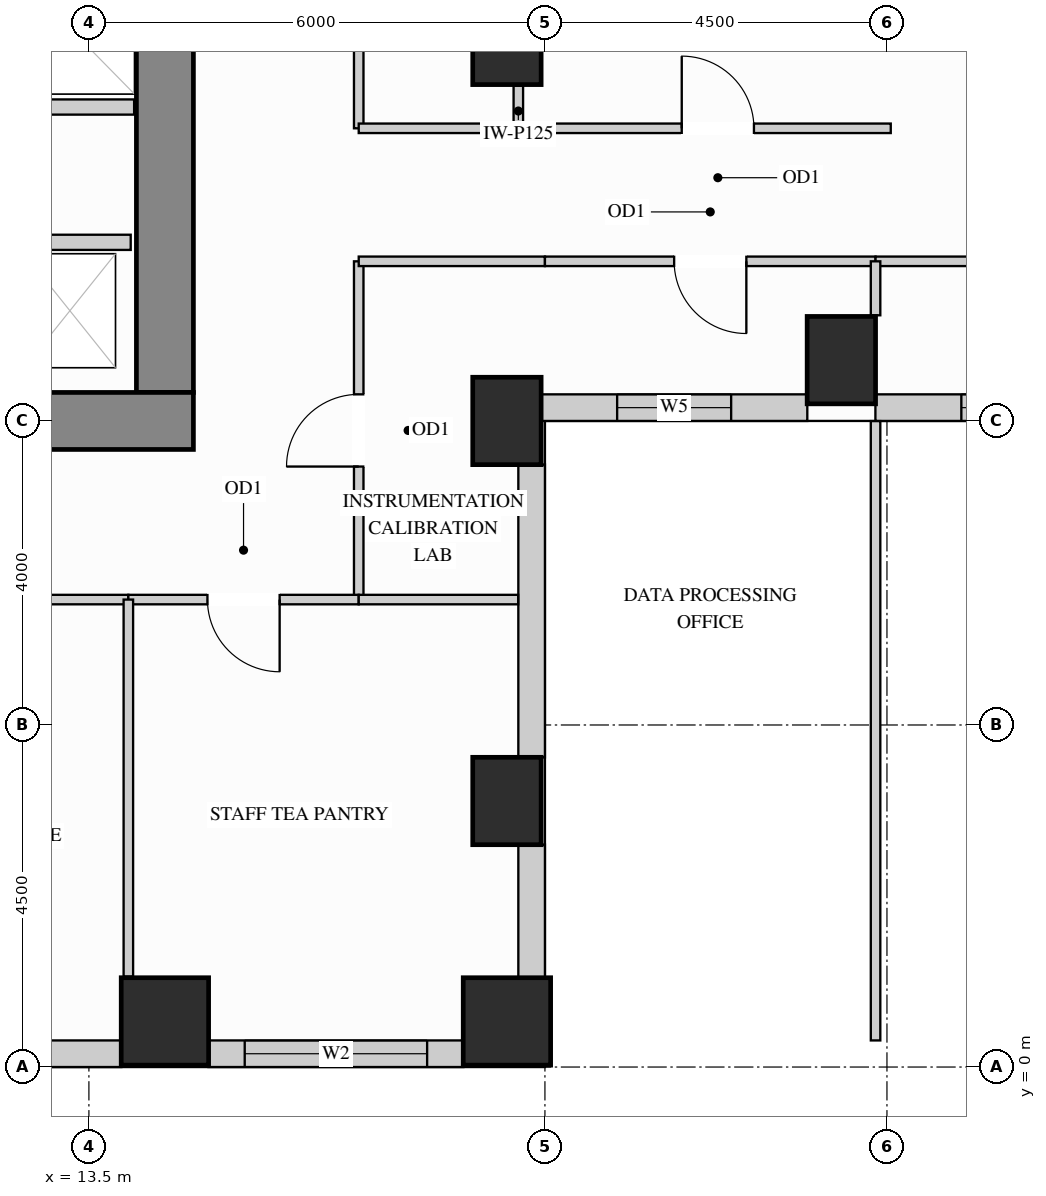
"""IFC4 building model, lengths in metres.
Left out: names, types, materials, properties, quantities, classifications, styles, units other than length and angle.
Written with IfcOpenShell. Run it as: python <this file> out.ifc"""

import sys

from ifc_helpers import new_model, si_unit, direction, frame, frame_2d, origin, origin_2d, place, context, subcontext, project, spatial, rectangle, extrude, source, transform, mapped, element, fill, save


model = new_model("IFC4")
c1 = context("Model", 3, precision=1e-05, world=origin(), true_north=direction((0.0, 1.0)))
c2 = subcontext(c1, "Body", "Model", "MODEL_VIEW")
j1 = project(units=[si_unit("LENGTHUNIT", "METRE"), si_unit("PLANEANGLEUNIT", "RADIAN")], contexts=[c1])
p1 = place(None, origin())
s1 = spatial("IfcSite", under=j1, at=p1, CompositionType="ELEMENT")
p2 = place(p1, origin())
s2 = spatial("IfcBuilding", under=s1, at=p2, CompositionType="ELEMENT")
p3 = place(p2, frame((0.0, 0.0, 95.4)))
s3 = spatial("IfcBuildingStorey", under=s2, at=p3, CompositionType="ELEMENT", Elevation=95.4)
m1 = source(origin(), c2, "Body", "SweptSolid", [
    extrude(rectangle(XDim=0.9, YDim=1.15, at=origin_2d()), origin(), (0.0, 0.0, 1.0), 3.38),
])
for number, where, z_axis, x_axis in (
    (1, (19.0, 13.5, 0.0), (0.0, 0.0, 1.0), (1.0, 0.0, 0.0)),
    (2, (19.0, 3.5, 0.0), (0.0, 0.0, 1.0), (1.0, 0.0, 0.0)),
    (3, (19.0, 8.5, 0.0), (0.0, 0.0, 1.0), (1.0, 0.0, 0.0)),
    (4, (23.4, 9.3, 0.0), (0.0, 0.0, 1.0), (1.0, 0.0, 0.0)),
):
    element("IfcColumn", number, at=place(p3, frame(where, z_axis=z_axis, x_axis=x_axis)), inside=s3, PredefinedType="COLUMN", context=c2, shape_type="MappedRepresentation", body=[
        mapped(m1, transform((0.0, 0.0, 0.0), x_axis=(1.0, 0.0, 0.0), y_axis=(0.0, 1.0, 0.0), z_axis=(0.0, 0.0, 1.0))),
    ])
m2 = source(origin(), c2, "Body", "SweptSolid", [
    extrude(rectangle(XDim=1.15, YDim=1.15, at=origin_2d()), origin(), (0.0, 0.0, 1.0), 3.38),
])
for number, where, z_axis, x_axis in (
    (5, (14.5, 0.6, 0.0), (0.0, 0.0, 1.0), (1.0, 0.0, 0.0)),
    (6, (19.0, 0.6, 0.0), (0.0, 0.0, 1.0), (1.0, 0.0, 0.0)),
):
    element("IfcColumn", number, at=place(p3, frame(where, z_axis=z_axis, x_axis=x_axis)), inside=s3, PredefinedType="COLUMN", context=c2, shape_type="MappedRepresentation", body=[
        mapped(m2, transform((0.0, 0.0, 0.0), x_axis=(1.0, 0.0, 0.0), y_axis=(0.0, 1.0, 0.0), z_axis=(0.0, 0.0, 1.0))),
    ])
m3 = source(origin(), c2, "Body", "SweptSolid", [
    extrude(rectangle(XDim=9.945, YDim=0.75, at=frame_2d((4.973, 0.0))), origin(), (0.0, 0.0, 1.0), 3.38),
])
p4 = place(p3, frame((14.5, 8.875, 0.0), z_axis=(0.0, 0.0, 1.0), x_axis=(0.0, 1.0, 0.0)))
e7 = element("IfcWall", 7, at=p4, inside=s3, PredefinedType="SHEAR", context=c2, shape_type="MappedRepresentation", body=[
    mapped(m3, transform((0.0, 0.0, 0.0), x_axis=(1.0, 0.0, 0.0), y_axis=(0.0, 1.0, 0.0), z_axis=(0.0, 0.0, 1.0))),
])
m4 = source(origin(), c2, "Body", "SweptSolid", [
    extrude(rectangle(XDim=10.75, YDim=0.75, at=frame_2d((5.375, 0.0))), origin(), (0.0, 0.0, 1.0), 3.38),
])
p5 = place(p3, frame((4.125, 8.5, 0.0), z_axis=(0.0, 0.0, 1.0), x_axis=(1.0, 0.0, 0.0)))
e8 = element("IfcWall", 8, at=p5, inside=s3, PredefinedType="SHEAR", context=c2, shape_type="MappedRepresentation", body=[
    mapped(m4, transform((0.0, 0.0, 0.0), x_axis=(1.0, 0.0, 0.0), y_axis=(0.0, 1.0, 0.0), z_axis=(0.0, 0.0, 1.0))),
])
p6 = place(p3, frame((9.573, 0.175, 0.0), z_axis=(0.0, 0.0, 1.0), x_axis=(1.0, 0.0, 0.0)))
e9 = element("IfcWall", 9, at=p6, inside=s3, PredefinedType="SOLIDWALL", context=c2, shape_type="SweptSolid", body=[
    extrude(rectangle(XDim=4.354, YDim=0.35, at=frame_2d((2.177, 0.0))), origin(), (0.0, 0.0, 1.0), 3.365),
])
p7 = place(p6, frame((0.977, 0.0, 0.78)))
e10 = element("IfcOpeningElement", 10, at=p7, cuts=e9, PredefinedType="OPENING", context=c2, shape_type="SweptSolid", body=[
    extrude(rectangle(XDim=2.4, YDim=2.1, at=frame_2d((1.2, 1.05))), frame((0.0, 0.185, 0.0), z_axis=(0.0, -1.0, 0.0), x_axis=(1.0, 0.0, 0.0)), (0.0, 0.0, 1.0), 0.37),
])
p8 = place(p3, frame((15.073, 0.175, 0.0), z_axis=(0.0, 0.0, 1.0), x_axis=(1.0, 0.0, 0.0)))
e11 = element("IfcWall", 11, at=p8, inside=s3, PredefinedType="SOLIDWALL", context=c2, shape_type="SweptSolid", body=[
    extrude(rectangle(XDim=3.354, YDim=0.35, at=frame_2d((1.677, 0.0))), origin(), (0.0, 0.0, 1.0), 3.365),
])
p9 = place(p8, frame((0.477, 0.0, 0.78)))
e12 = element("IfcOpeningElement", 12, at=p9, cuts=e11, PredefinedType="OPENING", context=c2, shape_type="SweptSolid", body=[
    extrude(rectangle(XDim=2.4, YDim=2.1, at=frame_2d((1.2, 1.05))), frame((0.0, 0.185, 0.0), z_axis=(0.0, -1.0, 0.0), x_axis=(1.0, 0.0, 0.0)), (0.0, 0.0, 1.0), 0.37),
])
m5 = source(origin(), c2, "Body", "SweptSolid", [
    extrude(rectangle(XDim=1.754, YDim=0.35, at=frame_2d((0.877, 0.0))), origin(), (0.0, 0.0, 1.0), 2.519),
])
p10 = place(p3, frame((19.325, 1.173, 0.0), z_axis=(0.0, 0.0, 1.0), x_axis=(0.0, 1.0, 0.0)))
e13 = element("IfcWall", 13, at=p10, inside=s3, PredefinedType="SOLIDWALL", context=c2, shape_type="MappedRepresentation", body=[
    mapped(m5, transform((0.0, 0.0, 0.0), x_axis=(1.0, 0.0, 0.0), y_axis=(0.0, 1.0, 0.0), z_axis=(0.0, 0.0, 1.0))),
])
m6 = source(origin(), c2, "Body", "SweptSolid", [
    extrude(rectangle(XDim=3.854, YDim=0.35, at=frame_2d((1.927, 0.0))), origin(), (0.0, 0.0, 1.0), 2.519),
])
p11 = place(p3, frame((19.325, 4.073, 0.0), z_axis=(0.0, 0.0, 1.0), x_axis=(0.0, 1.0, 0.0)))
e14 = element("IfcWall", 14, at=p11, inside=s3, PredefinedType="SOLIDWALL", context=c2, shape_type="MappedRepresentation", body=[
    mapped(m6, transform((0.0, 0.0, 0.0), x_axis=(1.0, 0.0, 0.0), y_axis=(0.0, 1.0, 0.0), z_axis=(0.0, 0.0, 1.0))),
])
p12 = place(p3, frame((19.448, 8.675, 0.0), z_axis=(0.0, 0.0, 1.0), x_axis=(1.0, 0.0, 0.0)))
e15 = element("IfcWall", 15, at=p12, inside=s3, PredefinedType="SOLIDWALL", context=c2, shape_type="SweptSolid", body=[
    extrude(rectangle(XDim=3.504, YDim=0.35, at=frame_2d((1.752, 0.0))), origin(), (0.0, 0.0, 1.0), 3.365),
])
p13 = place(p12, frame((1.002, 0.0, 0.78)))
e16 = element("IfcOpeningElement", 16, at=p13, cuts=e15, PredefinedType="OPENING", context=c2, shape_type="SweptSolid", body=[
    extrude(rectangle(XDim=1.5, YDim=2.0, at=frame_2d((0.75, 1.0))), frame((0.0, 0.185, 0.0), z_axis=(0.0, -1.0, 0.0), x_axis=(1.0, 0.0, 0.0)), (0.0, 0.0, 1.0), 0.37),
])
p14 = place(p3, frame((23.848, 8.675, 0.0), z_axis=(0.0, 0.0, 1.0), x_axis=(1.0, 0.0, 0.0)))
e17 = element("IfcWall", 17, at=p14, inside=s3, PredefinedType="SOLIDWALL", context=c2, shape_type="SweptSolid", body=[
    extrude(rectangle(XDim=6.204, YDim=0.35, at=frame_2d((3.102, 0.0))), origin(), (0.0, 0.0, 1.0), 3.365),
])
p15 = place(p14, frame((1.131, 0.0, 0.78)))
e18 = element("IfcOpeningElement", 18, at=p15, cuts=e17, PredefinedType="OPENING", context=c2, shape_type="SweptSolid", body=[
    extrude(rectangle(XDim=1.5, YDim=2.0, at=frame_2d((0.75, 1.0))), frame((0.0, 0.185, 0.0), z_axis=(0.0, -1.0, 0.0), x_axis=(1.0, 0.0, 0.0)), (0.0, 0.0, 1.0), 0.37),
])
p16 = place(p14, frame((3.441, 0.0, 0.78)))
e19 = element("IfcOpeningElement", 19, at=p16, cuts=e17, PredefinedType="OPENING", context=c2, shape_type="SweptSolid", body=[
    extrude(rectangle(XDim=1.5, YDim=2.0, at=frame_2d((0.75, 1.0))), frame((0.0, 0.185, 0.0), z_axis=(0.0, -1.0, 0.0), x_axis=(1.0, 0.0, 0.0)), (0.0, 0.0, 1.0), 0.37),
])
m7 = source(origin(), c2, "Body", "SweptSolid", [
    extrude(rectangle(XDim=0.56, YDim=0.125, at=frame_2d((0.28, 0.0))), origin(), (0.0, 0.0, 1.0), 2.677),
])
p17 = place(p3, frame((19.15, 12.35, 0.0), z_axis=(0.0, 0.0, 1.0), x_axis=(0.0, 1.0, 0.0)))
e20 = element("IfcWall", 20, at=p17, inside=s3, PredefinedType="PARTITIONING", context=c2, shape_type="MappedRepresentation", body=[
    mapped(m7, transform((0.0, 0.0, 0.0), x_axis=(1.0, 0.0, 0.0), y_axis=(0.0, 1.0, 0.0), z_axis=(0.0, 0.0, 1.0))),
])
p18 = place(p3, frame((17.05, 12.35, 0.0), z_axis=(0.0, 0.0, 1.0), x_axis=(0.0, 1.0, 0.0)))
e21 = element("IfcWall", 21, at=p18, inside=s3, PredefinedType="PARTITIONING", context=c2, shape_type="SweptSolid", body=[
    extrude(rectangle(XDim=6.45, YDim=0.125, at=frame_2d((3.225, 0.0))), origin(), (0.0, 0.0, 1.0), 3.365),
])
p19 = place(p18, frame((2.75, 0.0, 0.0)))
e22 = element("IfcOpeningElement", 22, at=p19, cuts=e21, PredefinedType="OPENING", context=c2, shape_type="SweptSolid", body=[
    extrude(rectangle(XDim=0.95, YDim=2.15, at=frame_2d((0.475, 1.075))), frame((0.0, 0.073, 0.0), z_axis=(0.0, -1.0, 0.0), x_axis=(1.0, 0.0, 0.0)), (0.0, 0.0, 1.0), 0.145),
])
p20 = place(p3, frame((17.05, 6.15, 0.0), z_axis=(0.0, 0.0, 1.0), x_axis=(0.0, 1.0, 0.0)))
e23 = element("IfcWall", 23, at=p20, inside=s3, PredefinedType="PARTITIONING", context=c2, shape_type="SweptSolid", body=[
    extrude(rectangle(XDim=4.45, YDim=0.125, at=frame_2d((2.225, 0.0))), origin(), (0.0, 0.0, 1.0), 3.365),
])
p21 = place(p20, frame((1.75, 0.0, 0.0)))
e24 = element("IfcOpeningElement", 24, at=p21, cuts=e23, PredefinedType="OPENING", context=c2, shape_type="SweptSolid", body=[
    extrude(rectangle(XDim=0.95, YDim=2.15, at=frame_2d((0.475, 1.075))), frame((0.0, 0.073, 0.0), z_axis=(0.0, -1.0, 0.0), x_axis=(1.0, 0.0, 0.0)), (0.0, 0.0, 1.0), 0.145),
])
m8 = source(origin(), c2, "Body", "SweptSolid", [
    extrude(rectangle(XDim=2.45, YDim=0.125, at=frame_2d((1.225, 0.0))), origin(), (0.0, 0.0, 1.0), 3.365),
])
p22 = place(p3, frame((17.05, 12.35, 0.0), z_axis=(0.0, 0.0, 1.0), x_axis=(1.0, 0.0, 0.0)))
e25 = element("IfcWall", 25, at=p22, inside=s3, PredefinedType="PARTITIONING", context=c2, shape_type="MappedRepresentation", body=[
    mapped(m8, transform((0.0, 0.0, 0.0), x_axis=(1.0, 0.0, 0.0), y_axis=(0.0, 1.0, 0.0), z_axis=(0.0, 0.0, 1.0))),
])
p23 = place(p3, frame((19.5, 12.35, 0.0), z_axis=(0.0, 0.0, 1.0), x_axis=(1.0, 0.0, 0.0)))
e26 = element("IfcWall", 26, at=p23, inside=s3, PredefinedType="PARTITIONING", context=c2, shape_type="SweptSolid", body=[
    extrude(rectangle(XDim=4.55, YDim=0.125, at=frame_2d((2.275, 0.0))), origin(), (0.0, 0.0, 1.0), 3.365),
])
p24 = place(p23, frame((1.8, 0.0, 0.0)))
e27 = element("IfcOpeningElement", 27, at=p24, cuts=e26, PredefinedType="OPENING", context=c2, shape_type="SweptSolid", body=[
    extrude(rectangle(XDim=0.95, YDim=2.15, at=frame_2d((0.475, 1.075))), frame((0.0, 0.073, 0.0), z_axis=(0.0, -1.0, 0.0), x_axis=(1.0, 0.0, 0.0)), (0.0, 0.0, 1.0), 0.145),
])
p25 = place(p3, frame((17.05, 10.6, 0.0), z_axis=(0.0, 0.0, 1.0), x_axis=(1.0, 0.0, 0.0)))
e28 = element("IfcWall", 28, at=p25, inside=s3, PredefinedType="PARTITIONING", context=c2, shape_type="MappedRepresentation", body=[
    mapped(m8, transform((0.0, 0.0, 0.0), x_axis=(1.0, 0.0, 0.0), y_axis=(0.0, 1.0, 0.0), z_axis=(0.0, 0.0, 1.0))),
])
p26 = place(p3, frame((19.5, 10.6, 0.0), z_axis=(0.0, 0.0, 1.0), x_axis=(1.0, 0.0, 0.0)))
e29 = element("IfcWall", 29, at=p26, inside=s3, PredefinedType="PARTITIONING", context=c2, shape_type="SweptSolid", body=[
    extrude(rectangle(XDim=4.35, YDim=0.125, at=frame_2d((2.175, 0.0))), origin(), (0.0, 0.0, 1.0), 3.365),
])
p27 = place(p26, frame((1.7, 0.0, 0.0)))
e30 = element("IfcOpeningElement", 30, at=p27, cuts=e29, PredefinedType="OPENING", context=c2, shape_type="SweptSolid", body=[
    extrude(rectangle(XDim=0.95, YDim=2.15, at=frame_2d((0.475, 1.075))), frame((0.0, 0.073, 0.0), z_axis=(0.0, -1.0, 0.0), x_axis=(1.0, 0.0, 0.0)), (0.0, 0.0, 1.0), 0.145),
])
p28 = place(p3, frame((23.85, 10.6, 0.0), z_axis=(0.0, 0.0, 1.0), x_axis=(1.0, 0.0, 0.0)))
e31 = element("IfcWall", 31, at=p28, inside=s3, PredefinedType="PARTITIONING", context=c2, shape_type="SweptSolid", body=[
    extrude(rectangle(XDim=6.0, YDim=0.125, at=frame_2d((3.0, 0.0))), origin(), (0.0, 0.0, 1.0), 3.365),
])
p29 = place(p28, frame((2.525, 0.0, 0.0)))
e32 = element("IfcOpeningElement", 32, at=p29, cuts=e31, PredefinedType="OPENING", context=c2, shape_type="SweptSolid", body=[
    extrude(rectangle(XDim=0.95, YDim=2.15, at=frame_2d((0.475, 1.075))), frame((0.0, 0.073, 0.0), z_axis=(0.0, -1.0, 0.0), x_axis=(1.0, 0.0, 0.0)), (0.0, 0.0, 1.0), 0.145),
])
m9 = source(origin(), c2, "Body", "SweptSolid", [
    extrude(rectangle(XDim=8.148, YDim=0.125, at=frame_2d((4.074, 0.0))), origin(), (0.0, 0.0, 1.0), 3.365),
])
p30 = place(p3, frame((23.85, 0.35, 0.0), z_axis=(0.0, 0.0, 1.0), x_axis=(0.0, 1.0, 0.0)))
e33 = element("IfcWall", 33, at=p30, inside=s3, PredefinedType="PARTITIONING", context=c2, shape_type="MappedRepresentation", body=[
    mapped(m9, transform((0.0, 0.0, 0.0), x_axis=(1.0, 0.0, 0.0), y_axis=(0.0, 1.0, 0.0), z_axis=(0.0, 0.0, 1.0))),
])
m10 = source(origin(), c2, "Body", "SweptSolid", [
    extrude(rectangle(XDim=0.71, YDim=0.125, at=frame_2d((0.355, 0.0))), origin(), (0.0, 0.0, 1.0), 3.365),
])
p31 = place(p3, frame((23.85, 9.89, 0.0), z_axis=(0.0, 0.0, 1.0), x_axis=(0.0, 1.0, 0.0)))
e34 = element("IfcWall", 34, at=p31, inside=s3, PredefinedType="PARTITIONING", context=c2, shape_type="MappedRepresentation", body=[
    mapped(m10, transform((0.0, 0.0, 0.0), x_axis=(1.0, 0.0, 0.0), y_axis=(0.0, 1.0, 0.0), z_axis=(0.0, 0.0, 1.0))),
])
p32 = place(p3, frame((8.392, 6.15, 0.0), z_axis=(0.0, 0.0, 1.0), x_axis=(1.0, 0.0, 0.0)))
e35 = element("IfcWall", 35, at=p32, inside=s3, PredefinedType="PARTITIONING", context=c2, shape_type="SweptSolid", body=[
    extrude(rectangle(XDim=5.627, YDim=0.125, at=frame_2d((2.813, 0.0))), origin(), (0.0, 0.0, 1.0), 3.365),
])
p33 = place(p32, frame((2.338, 0.0, 0.0)))
e36 = element("IfcOpeningElement", 36, at=p33, cuts=e35, PredefinedType="OPENING", context=c2, shape_type="SweptSolid", body=[
    extrude(rectangle(XDim=0.95, YDim=2.15, at=frame_2d((0.475, 1.075))), frame((0.0, 0.073, 0.0), z_axis=(0.0, -1.0, 0.0), x_axis=(1.0, 0.0, 0.0)), (0.0, 0.0, 1.0), 0.145),
])
p34 = place(p3, frame((14.019, 6.15, 0.0), z_axis=(0.0, 0.0, 1.0), x_axis=(1.0, 0.0, 0.0)))
e37 = element("IfcWall", 37, at=p34, inside=s3, PredefinedType="PARTITIONING", context=c2, shape_type="SweptSolid", body=[
    extrude(rectangle(XDim=3.031, YDim=0.125, at=frame_2d((1.516, 0.0))), origin(), (0.0, 0.0, 1.0), 3.365),
])
p35 = place(p34, frame((1.041, 0.0, 0.0)))
e38 = element("IfcOpeningElement", 38, at=p35, cuts=e37, PredefinedType="OPENING", context=c2, shape_type="SweptSolid", body=[
    extrude(rectangle(XDim=0.95, YDim=2.15, at=frame_2d((0.475, 1.075))), frame((0.0, 0.073, 0.0), z_axis=(0.0, -1.0, 0.0), x_axis=(1.0, 0.0, 0.0)), (0.0, 0.0, 1.0), 0.145),
])
m11 = source(origin(), c2, "Body", "SweptSolid", [
    extrude(rectangle(XDim=2.098, YDim=0.125, at=frame_2d((1.049, 0.0))), origin(), (0.0, 0.0, 1.0), 3.365),
])
p36 = place(p3, frame((17.05, 6.15, 0.0), z_axis=(0.0, 0.0, 1.0), x_axis=(1.0, 0.0, 0.0)))
e39 = element("IfcWall", 39, at=p36, inside=s3, PredefinedType="PARTITIONING", context=c2, shape_type="MappedRepresentation", body=[
    mapped(m11, transform((0.0, 0.0, 0.0), x_axis=(1.0, 0.0, 0.0), y_axis=(0.0, 1.0, 0.0), z_axis=(0.0, 0.0, 1.0))),
])
m12 = source(origin(), c2, "Body", "SweptSolid", [
    extrude(rectangle(XDim=4.96, YDim=0.125, at=frame_2d((2.48, 0.0))), origin(), (0.0, 0.0, 1.0), 3.365),
])
p37 = place(p3, frame((14.019, 1.19, 0.0), z_axis=(0.0, 0.0, 1.0), x_axis=(0.0, 1.0, 0.0)))
e40 = element("IfcWall", 40, at=p37, inside=s3, PredefinedType="PARTITIONING", context=c2, shape_type="MappedRepresentation", body=[
    mapped(m12, transform((0.0, 0.0, 0.0), x_axis=(1.0, 0.0, 0.0), y_axis=(0.0, 1.0, 0.0), z_axis=(0.0, 0.0, 1.0))),
])
m13 = source(origin(), c2, "Body", "SweptSolid", [
    extrude(rectangle(XDim=1.63, YDim=0.2, at=frame_2d((0.815, 0.0))), origin(), (0.0, 0.0, 1.0), 3.365),
])
p38 = place(p3, frame((12.42, 10.85, 0.0), z_axis=(0.0, 0.0, 1.0), x_axis=(1.0, 0.0, 0.0)))
e41 = element("IfcWall", 41, at=p38, inside=s3, PredefinedType="PARTITIONING", context=c2, shape_type="MappedRepresentation", body=[
    mapped(m13, transform((0.0, 0.0, 0.0), x_axis=(1.0, 0.0, 0.0), y_axis=(0.0, 1.0, 0.0), z_axis=(0.0, 0.0, 1.0))),
])
m14 = source(origin(), c2, "Body", "SweptSolid", [
    extrude(rectangle(XDim=1.865, YDim=0.2, at=frame_2d((0.933, 0.0))), origin(), (0.0, 0.0, 1.0), 3.365),
])
p39 = place(p3, frame((12.23, 12.63, 0.0), z_axis=(0.0, 0.0, 1.0), x_axis=(1.0, 0.0, 0.0)))
e42 = element("IfcWall", 42, at=p39, inside=s3, PredefinedType="PARTITIONING", context=c2, shape_type="MappedRepresentation", body=[
    mapped(m14, transform((0.0, 0.0, 0.0), x_axis=(1.0, 0.0, 0.0), y_axis=(0.0, 1.0, 0.0), z_axis=(0.0, 0.0, 1.0))),
])
m15 = source(origin(), c2, "Body", "SweptSolid", [
    extrude(rectangle(XDim=0.95, YDim=2.15, at=frame_2d((0.475, 1.075))), frame((0.0, 0.025, 0.0), z_axis=(0.0, -1.0, 0.0), x_axis=(1.0, 0.0, 0.0)), (0.0, 0.0, 1.0), 0.05),
])
p40 = place(p21, origin())
e43 = element("IfcDoor", 43, at=p40, inside=s3, OperationType="SINGLE_SWING_LEFT", PredefinedType="DOOR", context=c2, shape_type="MappedRepresentation", body=[
    mapped(m15, transform((0.0, 0.0, 0.0), x_axis=(1.0, 0.0, 0.0), y_axis=(0.0, 1.0, 0.0), z_axis=(0.0, 0.0, 1.0))),
])
fill(e24, e43)
p41 = place(p35, origin())
e44 = element("IfcDoor", 44, at=p41, inside=s3, OperationType="SINGLE_SWING_RIGHT", PredefinedType="DOOR", context=c2, shape_type="MappedRepresentation", body=[
    mapped(m15, transform((0.0, 0.0, 0.0), x_axis=(1.0, 0.0, 0.0), y_axis=(0.0, 1.0, 0.0), z_axis=(0.0, 0.0, 1.0))),
])
fill(e38, e44)
p42 = place(p24, origin())
e45 = element("IfcDoor", 45, at=p42, inside=s3, OperationType="SINGLE_SWING_LEFT", PredefinedType="DOOR", context=c2, shape_type="MappedRepresentation", body=[
    mapped(m15, transform((0.0, 0.0, 0.0), x_axis=(1.0, 0.0, 0.0), y_axis=(0.0, 1.0, 0.0), z_axis=(0.0, 0.0, 1.0))),
])
fill(e27, e45)
p43 = place(p27, origin())
e46 = element("IfcDoor", 46, at=p43, inside=s3, OperationType="SINGLE_SWING_RIGHT", PredefinedType="DOOR", context=c2, shape_type="MappedRepresentation", body=[
    mapped(m15, transform((0.0, 0.0, 0.0), x_axis=(1.0, 0.0, 0.0), y_axis=(0.0, 1.0, 0.0), z_axis=(0.0, 0.0, 1.0))),
])
fill(e30, e46)
m16 = source(origin(), c2, "Body", "SweptSolid", [
    extrude(rectangle(XDim=2.4, YDim=2.1, at=frame_2d((1.2, 1.05))), frame((0.0, 0.03, 0.0), z_axis=(0.0, -1.0, 0.0), x_axis=(1.0, 0.0, 0.0)), (0.0, 0.0, 1.0), 0.06),
])
p44 = place(p9, origin())
e47 = element("IfcWindow", 47, at=p44, inside=s3, PartitioningType="SINGLE_PANEL", PredefinedType="WINDOW", context=c2, shape_type="MappedRepresentation", body=[
    mapped(m16, transform((0.0, 0.0, 0.0), x_axis=(1.0, 0.0, 0.0), y_axis=(0.0, 1.0, 0.0), z_axis=(0.0, 0.0, 1.0))),
])
fill(e12, e47)
m17 = source(origin(), c2, "Body", "SweptSolid", [
    extrude(rectangle(XDim=1.5, YDim=2.0, at=frame_2d((0.75, 1.0))), frame((0.0, 0.03, 0.0), z_axis=(0.0, -1.0, 0.0), x_axis=(1.0, 0.0, 0.0)), (0.0, 0.0, 1.0), 0.06),
])
p45 = place(p13, origin())
e48 = element("IfcWindow", 48, at=p45, inside=s3, PartitioningType="SINGLE_PANEL", PredefinedType="WINDOW", context=c2, shape_type="MappedRepresentation", body=[
    mapped(m17, transform((0.0, 0.0, 0.0), x_axis=(1.0, 0.0, 0.0), y_axis=(0.0, 1.0, 0.0), z_axis=(0.0, 0.0, 1.0))),
])
fill(e16, e48)
p46 = place(p15, origin())
e49 = element("IfcWindow", 49, at=p46, inside=s3, PartitioningType="SINGLE_PANEL", PredefinedType="WINDOW", context=c2, shape_type="MappedRepresentation", body=[
    mapped(m17, transform((0.0, 0.0, 0.0), x_axis=(1.0, 0.0, 0.0), y_axis=(0.0, 1.0, 0.0), z_axis=(0.0, 0.0, 1.0))),
])
fill(e18, e49)
save(model, sys.argv[1])
